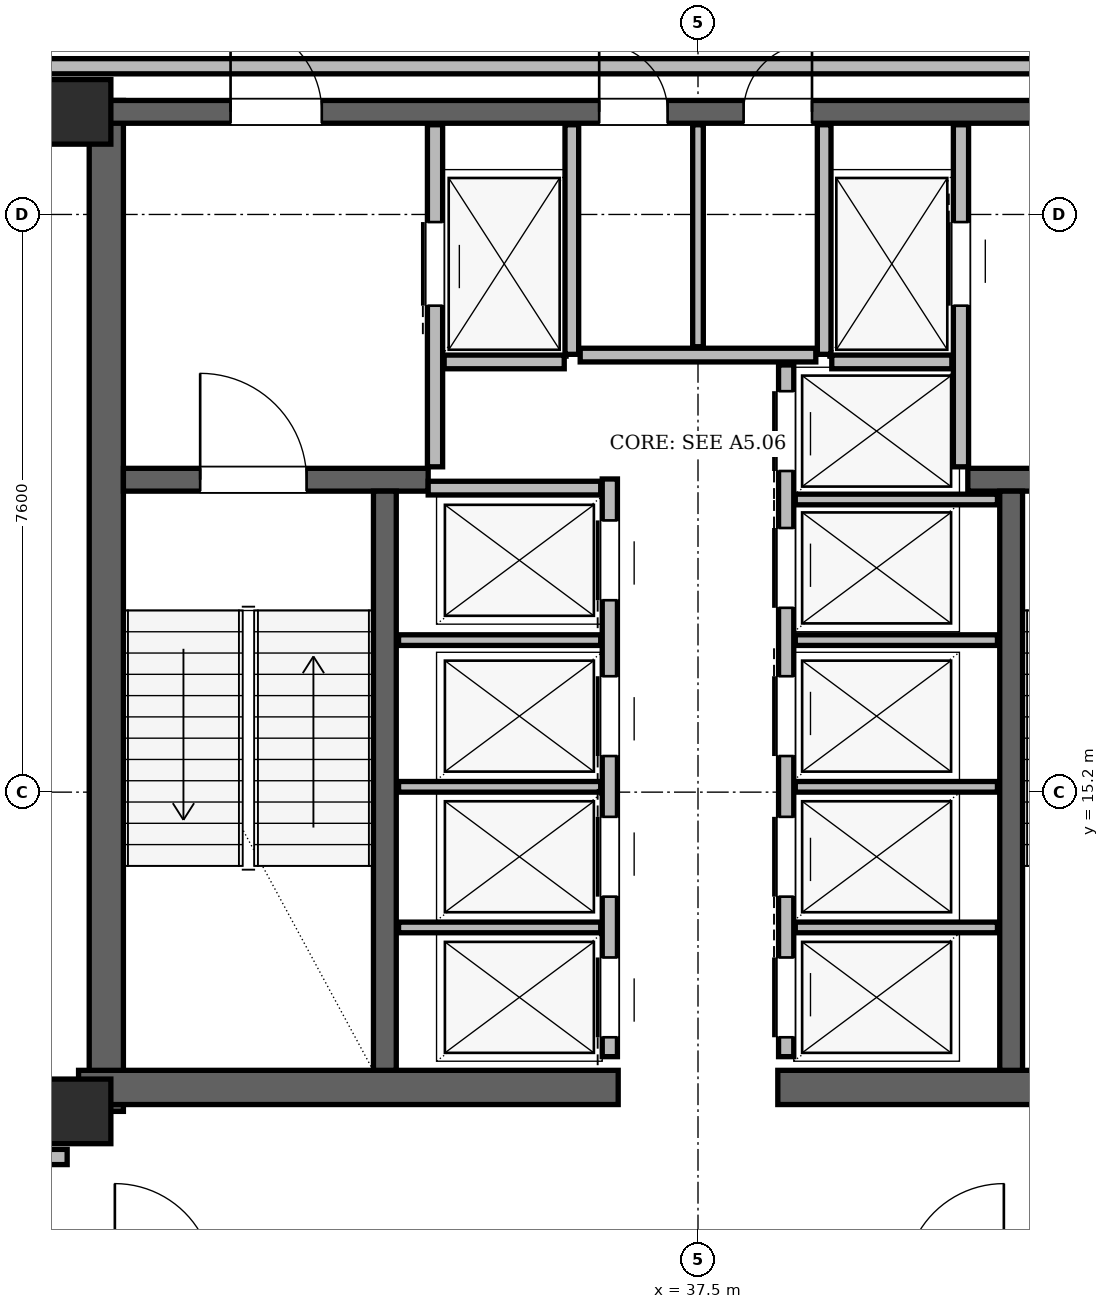
"""IFC4 building model, lengths in metres.
Left out: names, types, materials, properties, quantities, classifications, styles, units other than length and angle.
Written with IfcOpenShell. Run it as: python <this file> out.ifc"""

import sys

from ifc_helpers import new_model, si_unit, direction, frame, frame_2d, origin, origin_2d, place, context, subcontext, project, spatial, rectangle, hollow_rectangle, extrude, element, fill, save


model = new_model("IFC4")
c1 = context("Model", 3, precision=1e-05, world=origin(), true_north=direction((0.0, 1.0)))
c2 = subcontext(c1, "Body", "Model", "MODEL_VIEW")
j1 = project(units=[si_unit("LENGTHUNIT", "METRE"), si_unit("PLANEANGLEUNIT", "RADIAN")], contexts=[c1])
p1 = place(None, origin())
s1 = spatial("IfcSite", under=j1, at=p1, CompositionType="ELEMENT")
p2 = place(p1, origin())
s2 = spatial("IfcBuilding", under=s1, at=p2, CompositionType="ELEMENT")
p3 = place(p2, frame((0.0, 0.0, 107.7)))
s3 = spatial("IfcBuildingStorey", under=s2, at=p3, CompositionType="ELEMENT", Elevation=107.7)
for number, where, z_axis, x_axis in (
    (1, (29.35, 11.0, 0.0), (0.0, 0.0, 1.0), (1.0, 0.0, 0.0)),
    (2, (29.35, 24.15, 0.0), (0.0, 0.0, 1.0), (1.0, 0.0, 0.0)),
):
    element("IfcColumn", number, at=place(p3, frame(where, z_axis=z_axis, x_axis=x_axis)), inside=s3, PredefinedType="COLUMN", context=c2, shape_type="SweptSolid", body=[
        extrude(hollow_rectangle(XDim=0.85, YDim=0.85, WallThickness=0.07, at=origin_2d()), origin(), (0.0, 0.0, 1.0), 4.5),
    ])
p4 = place(p3, frame((29.715, 11.0, 0.0), z_axis=(0.0, 0.0, 1.0), x_axis=(0.0, 1.0, 0.0)))
e3 = element("IfcWall", 3, at=p4, inside=s3, PredefinedType="SHEAR", context=c2, shape_type="SweptSolid", body=[
    extrude(rectangle(XDim=13.3, YDim=0.45, at=frame_2d((6.65, 0.0))), origin(), (0.0, 0.0, 1.0), 4.26),
])
for number, where, z_axis, x_axis in (
    (4, (29.35, 11.315, 0.0), (0.0, 0.0, 1.0), (1.0, 0.0, 0.0)),
    (5, (38.55, 11.315, 0.0), (0.0, 0.0, 1.0), (1.0, 0.0, 0.0)),
):
    element("IfcWall", number, at=place(p3, frame(where, z_axis=z_axis, x_axis=x_axis)), inside=s3, PredefinedType="SHEAR", context=c2, shape_type="SweptSolid", body=[
        extrude(rectangle(XDim=7.1, YDim=0.45, at=frame_2d((3.55, 0.0))), origin(), (0.0, 0.0, 1.0), 4.26),
    ])
p5 = place(p3, frame((29.65, 24.15, 0.0), z_axis=(0.0, 0.0, 1.0), x_axis=(1.0, 0.0, 0.0)))
e6 = element("IfcWall", 6, at=p5, inside=s3, PredefinedType="SHEAR", context=c2, shape_type="SweptSolid", body=[
    extrude(rectangle(XDim=15.7, YDim=0.3, at=frame_2d((7.85, 0.0))), origin(), (0.0, 0.0, 1.0), 4.26),
])
p6 = place(p5, frame((1.7, 0.0, 0.0)))
e7 = element("IfcOpeningElement", 7, at=p6, cuts=e6, PredefinedType="OPENING", context=c2, shape_type="SweptSolid", body=[
    extrude(rectangle(XDim=1.2, YDim=2.2, at=frame_2d((0.6, 1.1))), frame((0.0, 0.15, 0.0), z_axis=(0.0, -1.0, 0.0), x_axis=(1.0, 0.0, 0.0)), (0.0, 0.0, 1.0), 0.3),
])
p7 = place(p5, frame((12.8, 0.0, 0.0)))
e8 = element("IfcOpeningElement", 8, at=p7, cuts=e6, PredefinedType="OPENING", context=c2, shape_type="SweptSolid", body=[
    extrude(rectangle(XDim=1.2, YDim=2.2, at=frame_2d((0.6, 1.1))), frame((0.0, 0.15, 0.0), z_axis=(0.0, -1.0, 0.0), x_axis=(1.0, 0.0, 0.0)), (0.0, 0.0, 1.0), 0.3),
])
p8 = place(p5, frame((6.55, 0.0, 0.0)))
e9 = element("IfcOpeningElement", 9, at=p8, cuts=e6, PredefinedType="OPENING", context=c2, shape_type="SweptSolid", body=[
    extrude(rectangle(XDim=0.9, YDim=2.05, at=frame_2d((0.45, 1.025))), frame((0.0, 0.15, 0.0), z_axis=(0.0, -1.0, 0.0), x_axis=(1.0, 0.0, 0.0)), (0.0, 0.0, 1.0), 0.3),
])
p9 = place(p5, frame((8.45, 0.0, 0.0)))
e10 = element("IfcOpeningElement", 10, at=p9, cuts=e6, PredefinedType="OPENING", context=c2, shape_type="SweptSolid", body=[
    extrude(rectangle(XDim=0.9, YDim=2.05, at=frame_2d((0.45, 1.025))), frame((0.0, 0.15, 0.0), z_axis=(0.0, -1.0, 0.0), x_axis=(1.0, 0.0, 0.0)), (0.0, 0.0, 1.0), 0.3),
])
p10 = place(p3, frame((29.94, 19.31, 0.0), z_axis=(0.0, 0.0, 1.0), x_axis=(1.0, 0.0, 0.0)))
e11 = element("IfcWall", 11, at=p10, inside=s3, PredefinedType="SHEAR", context=c2, shape_type="SweptSolid", body=[
    extrude(rectangle(XDim=4.01, YDim=0.3, at=frame_2d((2.005, 0.0))), origin(), (0.0, 0.0, 1.0), 4.26),
])
p11 = place(p10, frame((1.01, 0.0, 0.0)))
e12 = element("IfcOpeningElement", 12, at=p11, cuts=e11, PredefinedType="OPENING", context=c2, shape_type="SweptSolid", body=[
    extrude(rectangle(XDim=1.4, YDim=2.2, at=frame_2d((0.7, 1.1))), frame((0.0, 0.15, 0.0), z_axis=(0.0, -1.0, 0.0), x_axis=(1.0, 0.0, 0.0)), (0.0, 0.0, 1.0), 0.3),
])
p12 = place(p3, frame((41.05, 19.31, 0.0), z_axis=(0.0, 0.0, 1.0), x_axis=(1.0, 0.0, 0.0)))
e13 = element("IfcWall", 13, at=p12, inside=s3, PredefinedType="SHEAR", context=c2, shape_type="SweptSolid", body=[
    extrude(rectangle(XDim=4.01, YDim=0.3, at=frame_2d((2.005, 0.0))), origin(), (0.0, 0.0, 1.0), 4.26),
])
p13 = place(p12, frame((1.6, 0.0, 0.0)))
e14 = element("IfcOpeningElement", 14, at=p13, cuts=e13, PredefinedType="OPENING", context=c2, shape_type="SweptSolid", body=[
    extrude(rectangle(XDim=1.4, YDim=2.2, at=frame_2d((0.7, 1.1))), frame((0.0, 0.15, 0.0), z_axis=(0.0, -1.0, 0.0), x_axis=(1.0, 0.0, 0.0)), (0.0, 0.0, 1.0), 0.3),
])
for number, where, z_axis, x_axis in (
    (15, (33.38, 11.54, 0.0), (0.0, 0.0, 1.0), (0.0, 1.0, 0.0)),
    (16, (41.62, 11.54, 0.0), (0.0, 0.0, 1.0), (0.0, 1.0, 0.0)),
):
    element("IfcWall", number, at=place(p3, frame(where, z_axis=z_axis, x_axis=x_axis)), inside=s3, PredefinedType="SHEAR", context=c2, shape_type="SweptSolid", body=[
        extrude(rectangle(XDim=7.62, YDim=0.3, at=frame_2d((3.81, 0.0))), origin(), (0.0, 0.0, 1.0), 4.26),
    ])
p14 = place(p3, frame((34.04, 19.48, 0.0), z_axis=(0.0, 0.0, 1.0), x_axis=(0.0, 1.0, 0.0)))
e17 = element("IfcWall", 17, at=p14, inside=s3, PredefinedType="PARTITIONING", context=c2, shape_type="SweptSolid", body=[
    extrude(rectangle(XDim=4.5, YDim=0.2, at=frame_2d((2.25, 0.0))), origin(), (0.0, 0.0, 1.0), 3.3),
])
p15 = place(p14, frame((2.12, 0.0, 0.0)))
e18 = element("IfcOpeningElement", 18, at=p15, cuts=e17, PredefinedType="OPENING", context=c2, shape_type="SweptSolid", body=[
    extrude(rectangle(XDim=1.1, YDim=2.2, at=frame_2d((0.55, 1.1))), frame((0.0, 0.1, 0.0), z_axis=(0.0, -1.0, 0.0), x_axis=(1.0, 0.0, 0.0)), (0.0, 0.0, 1.0), 0.2),
])
p16 = place(p3, frame((35.84, 20.96, 0.0), z_axis=(0.0, 0.0, 1.0), x_axis=(0.0, 1.0, 0.0)))
e19 = element("IfcWall", 19, at=p16, inside=s3, PredefinedType="PARTITIONING", context=c2, shape_type="SweptSolid", body=[
    extrude(rectangle(XDim=3.02, YDim=0.18, at=frame_2d((1.51, 0.0))), origin(), (0.0, 0.0, 1.0), 3.3),
])
p17 = place(p3, frame((34.16, 20.86, 0.0), z_axis=(0.0, 0.0, 1.0), x_axis=(1.0, 0.0, 0.0)))
e20 = element("IfcWall", 20, at=p17, inside=s3, PredefinedType="PARTITIONING", context=c2, shape_type="SweptSolid", body=[
    extrude(rectangle(XDim=1.58, YDim=0.18, at=frame_2d((0.79, 0.0))), origin(), (0.0, 0.0, 1.0), 4.26),
])
p18 = place(p3, frame((40.96, 19.48, 0.0), z_axis=(0.0, 0.0, 1.0), x_axis=(0.0, 1.0, 0.0)))
e21 = element("IfcWall", 21, at=p18, inside=s3, PredefinedType="PARTITIONING", context=c2, shape_type="SweptSolid", body=[
    extrude(rectangle(XDim=4.5, YDim=0.2, at=frame_2d((2.25, 0.0))), origin(), (0.0, 0.0, 1.0), 3.3),
])
p19 = place(p18, frame((2.12, 0.0, 0.0)))
e22 = element("IfcOpeningElement", 22, at=p19, cuts=e21, PredefinedType="OPENING", context=c2, shape_type="SweptSolid", body=[
    extrude(rectangle(XDim=1.1, YDim=2.2, at=frame_2d((0.55, 1.1))), frame((0.0, 0.1, 0.0), z_axis=(0.0, -1.0, 0.0), x_axis=(1.0, 0.0, 0.0)), (0.0, 0.0, 1.0), 0.2),
])
p20 = place(p3, frame((39.16, 20.96, 0.0), z_axis=(0.0, 0.0, 1.0), x_axis=(0.0, 1.0, 0.0)))
e23 = element("IfcWall", 23, at=p20, inside=s3, PredefinedType="PARTITIONING", context=c2, shape_type="SweptSolid", body=[
    extrude(rectangle(XDim=3.02, YDim=0.18, at=frame_2d((1.51, 0.0))), origin(), (0.0, 0.0, 1.0), 3.3),
])
p21 = place(p3, frame((39.26, 20.86, 0.0), z_axis=(0.0, 0.0, 1.0), x_axis=(1.0, 0.0, 0.0)))
e24 = element("IfcWall", 24, at=p21, inside=s3, PredefinedType="PARTITIONING", context=c2, shape_type="SweptSolid", body=[
    extrude(rectangle(XDim=1.58, YDim=0.18, at=frame_2d((0.79, 0.0))), origin(), (0.0, 0.0, 1.0), 4.26),
])
p22 = place(p3, frame((36.34, 11.72, 0.0), z_axis=(0.0, 0.0, 1.0), x_axis=(0.0, 1.0, 0.0)))
e25 = element("IfcWall", 25, at=p22, inside=s3, PredefinedType="PARTITIONING", context=c2, shape_type="SweptSolid", body=[
    extrude(rectangle(XDim=7.6, YDim=0.2, at=frame_2d((3.8, 0.0))), origin(), (0.0, 0.0, 1.0), 4.26),
])
p23 = place(p22, frame((0.255, 0.0, 0.0)))
e26 = element("IfcOpeningElement", 26, at=p23, cuts=e25, PredefinedType="OPENING", context=c2, shape_type="SweptSolid", body=[
    extrude(rectangle(XDim=1.05, YDim=2.15, at=frame_2d((0.525, 1.075))), frame((0.0, 0.1, 0.0), z_axis=(0.0, -1.0, 0.0), x_axis=(1.0, 0.0, 0.0)), (0.0, 0.0, 1.0), 0.2),
])
p24 = place(p22, frame((2.105, 0.0, 0.0)))
e27 = element("IfcOpeningElement", 27, at=p24, cuts=e25, PredefinedType="OPENING", context=c2, shape_type="SweptSolid", body=[
    extrude(rectangle(XDim=1.05, YDim=2.15, at=frame_2d((0.525, 1.075))), frame((0.0, 0.1, 0.0), z_axis=(0.0, -1.0, 0.0), x_axis=(1.0, 0.0, 0.0)), (0.0, 0.0, 1.0), 0.2),
])
p25 = place(p22, frame((3.955, 0.0, 0.0)))
e28 = element("IfcOpeningElement", 28, at=p25, cuts=e25, PredefinedType="OPENING", context=c2, shape_type="SweptSolid", body=[
    extrude(rectangle(XDim=1.05, YDim=2.15, at=frame_2d((0.525, 1.075))), frame((0.0, 0.1, 0.0), z_axis=(0.0, -1.0, 0.0), x_axis=(1.0, 0.0, 0.0)), (0.0, 0.0, 1.0), 0.2),
])
p26 = place(p22, frame((6.005, 0.0, 0.0)))
e29 = element("IfcOpeningElement", 29, at=p26, cuts=e25, PredefinedType="OPENING", context=c2, shape_type="SweptSolid", body=[
    extrude(rectangle(XDim=1.05, YDim=2.15, at=frame_2d((0.525, 1.075))), frame((0.0, 0.1, 0.0), z_axis=(0.0, -1.0, 0.0), x_axis=(1.0, 0.0, 0.0)), (0.0, 0.0, 1.0), 0.2),
])
p27 = place(p3, frame((33.95, 19.2, 0.0), z_axis=(0.0, 0.0, 1.0), x_axis=(1.0, 0.0, 0.0)))
e30 = element("IfcWall", 30, at=p27, inside=s3, PredefinedType="PARTITIONING", context=c2, shape_type="SweptSolid", body=[
    extrude(rectangle(XDim=2.27, YDim=0.18, at=frame_2d((1.135, 0.0))), origin(), (0.0, 0.0, 1.0), 4.26),
])
for number, where, z_axis, x_axis in (
    (31, (33.56, 13.42, 0.0), (0.0, 0.0, 1.0), (1.0, 0.0, 0.0)),
    (32, (33.56, 15.27, 0.0), (0.0, 0.0, 1.0), (1.0, 0.0, 0.0)),
    (33, (33.56, 17.2, 0.0), (0.0, 0.0, 1.0), (1.0, 0.0, 0.0)),
):
    element("IfcWall", number, at=place(p3, frame(where, z_axis=z_axis, x_axis=x_axis)), inside=s3, PredefinedType="PARTITIONING", context=c2, shape_type="SweptSolid", body=[
        extrude(rectangle(XDim=2.66, YDim=0.14, at=frame_2d((1.33, 0.0))), origin(), (0.0, 0.0, 1.0), 4.26),
    ])
p28 = place(p3, frame((38.66, 11.72, 0.0), z_axis=(0.0, 0.0, 1.0), x_axis=(0.0, 1.0, 0.0)))
e34 = element("IfcWall", 34, at=p28, inside=s3, PredefinedType="PARTITIONING", context=c2, shape_type="SweptSolid", body=[
    extrude(rectangle(XDim=9.1, YDim=0.2, at=frame_2d((4.55, 0.0))), origin(), (0.0, 0.0, 1.0), 4.26),
])
p29 = place(p28, frame((0.255, 0.0, 0.0)))
e35 = element("IfcOpeningElement", 35, at=p29, cuts=e34, PredefinedType="OPENING", context=c2, shape_type="SweptSolid", body=[
    extrude(rectangle(XDim=1.05, YDim=2.15, at=frame_2d((0.525, 1.075))), frame((0.0, 0.1, 0.0), z_axis=(0.0, -1.0, 0.0), x_axis=(1.0, 0.0, 0.0)), (0.0, 0.0, 1.0), 0.2),
])
p30 = place(p28, frame((2.105, 0.0, 0.0)))
e36 = element("IfcOpeningElement", 36, at=p30, cuts=e34, PredefinedType="OPENING", context=c2, shape_type="SweptSolid", body=[
    extrude(rectangle(XDim=1.05, YDim=2.15, at=frame_2d((0.525, 1.075))), frame((0.0, 0.1, 0.0), z_axis=(0.0, -1.0, 0.0), x_axis=(1.0, 0.0, 0.0)), (0.0, 0.0, 1.0), 0.2),
])
p31 = place(p28, frame((3.955, 0.0, 0.0)))
e37 = element("IfcOpeningElement", 37, at=p31, cuts=e34, PredefinedType="OPENING", context=c2, shape_type="SweptSolid", body=[
    extrude(rectangle(XDim=1.05, YDim=2.15, at=frame_2d((0.525, 1.075))), frame((0.0, 0.1, 0.0), z_axis=(0.0, -1.0, 0.0), x_axis=(1.0, 0.0, 0.0)), (0.0, 0.0, 1.0), 0.2),
])
p32 = place(p28, frame((5.905, 0.0, 0.0)))
e38 = element("IfcOpeningElement", 38, at=p32, cuts=e34, PredefinedType="OPENING", context=c2, shape_type="SweptSolid", body=[
    extrude(rectangle(XDim=1.05, YDim=2.15, at=frame_2d((0.525, 1.075))), frame((0.0, 0.1, 0.0), z_axis=(0.0, -1.0, 0.0), x_axis=(1.0, 0.0, 0.0)), (0.0, 0.0, 1.0), 0.2),
])
p33 = place(p28, frame((7.705, 0.0, 0.0)))
e39 = element("IfcOpeningElement", 39, at=p33, cuts=e34, PredefinedType="OPENING", context=c2, shape_type="SweptSolid", body=[
    extrude(rectangle(XDim=1.05, YDim=2.15, at=frame_2d((0.525, 1.075))), frame((0.0, 0.1, 0.0), z_axis=(0.0, -1.0, 0.0), x_axis=(1.0, 0.0, 0.0)), (0.0, 0.0, 1.0), 0.2),
])
for number, where, z_axis, x_axis in (
    (40, (38.78, 13.42, 0.0), (0.0, 0.0, 1.0), (1.0, 0.0, 0.0)),
    (41, (38.78, 15.27, 0.0), (0.0, 0.0, 1.0), (1.0, 0.0, 0.0)),
    (42, (38.78, 17.2, 0.0), (0.0, 0.0, 1.0), (1.0, 0.0, 0.0)),
    (43, (38.78, 19.05, 0.0), (0.0, 0.0, 1.0), (1.0, 0.0, 0.0)),
):
    element("IfcWall", number, at=place(p3, frame(where, z_axis=z_axis, x_axis=x_axis)), inside=s3, PredefinedType="PARTITIONING", context=c2, shape_type="SweptSolid", body=[
        extrude(rectangle(XDim=2.66, YDim=0.14, at=frame_2d((1.33, 0.0))), origin(), (0.0, 0.0, 1.0), 4.26),
    ])
p34 = place(p3, frame((35.95, 20.95, 0.0), z_axis=(0.0, 0.0, 1.0), x_axis=(1.0, 0.0, 0.0)))
e44 = element("IfcWall", 44, at=p34, inside=s3, PredefinedType="PARTITIONING", context=c2, shape_type="SweptSolid", body=[
    extrude(rectangle(XDim=3.1, YDim=0.18, at=frame_2d((1.55, 0.0))), origin(), (0.0, 0.0, 1.0), 4.26),
])
p35 = place(p3, frame((37.5, 21.06, 0.0), z_axis=(0.0, 0.0, 1.0), x_axis=(0.0, 1.0, 0.0)))
e45 = element("IfcWall", 45, at=p35, inside=s3, PredefinedType="PARTITIONING", context=c2, shape_type="SweptSolid", body=[
    extrude(rectangle(XDim=2.92, YDim=0.14, at=frame_2d((1.46, 0.0))), origin(), (0.0, 0.0, 1.0), 3.3),
])
p36 = place(p3, frame((28.62, 10.4, 0.0), z_axis=(0.0, 0.0, 1.0), x_axis=(1.0, 0.0, 0.0)))
e46 = element("IfcWall", 46, at=p36, inside=s3, PredefinedType="PARTITIONING", context=c2, shape_type="SweptSolid", body=[
    extrude(rectangle(XDim=0.58, YDim=0.2, at=frame_2d((0.29, 0.0))), origin(), (0.0, 0.0, 1.0), 3.714),
])
p37 = place(p3, frame((28.62, 24.75, 0.0), z_axis=(0.0, 0.0, 1.0), x_axis=(1.0, 0.0, 0.0)))
e47 = element("IfcWall", 47, at=p37, inside=s3, PredefinedType="PARTITIONING", context=c2, shape_type="SweptSolid", body=[
    extrude(rectangle(XDim=17.76, YDim=0.2, at=frame_2d((8.88, 0.0))), origin(), (0.0, 0.0, 1.0), 3.714),
])
p38 = place(p15, origin())
e48 = element("IfcDoor", 48, at=p38, inside=s3, OperationType="SLIDING_TO_LEFT", PredefinedType="DOOR", context=c2, shape_type="SweptSolid", body=[
    extrude(rectangle(XDim=1.1, YDim=2.2, at=frame_2d((0.55, 1.1))), frame((0.0, 0.025, 0.0), z_axis=(0.0, -1.0, 0.0), x_axis=(1.0, 0.0, 0.0)), (0.0, 0.0, 1.0), 0.05),
])
fill(e18, e48)
p39 = place(p19, origin())
e49 = element("IfcDoor", 49, at=p39, inside=s3, OperationType="SLIDING_TO_RIGHT", PredefinedType="DOOR", context=c2, shape_type="SweptSolid", body=[
    extrude(rectangle(XDim=1.1, YDim=2.2, at=frame_2d((0.55, 1.1))), frame((0.0, 0.025, 0.0), z_axis=(0.0, -1.0, 0.0), x_axis=(1.0, 0.0, 0.0)), (0.0, 0.0, 1.0), 0.05),
])
fill(e22, e49)
p40 = place(p23, origin())
e50 = element("IfcDoor", 50, at=p40, inside=s3, OperationType="SLIDING_TO_LEFT", PredefinedType="DOOR", context=c2, shape_type="SweptSolid", body=[
    extrude(rectangle(XDim=1.05, YDim=2.15, at=frame_2d((0.525, 1.075))), frame((0.0, 0.025, 0.0), z_axis=(0.0, -1.0, 0.0), x_axis=(1.0, 0.0, 0.0)), (0.0, 0.0, 1.0), 0.05),
])
fill(e26, e50)
p41 = place(p24, origin())
e51 = element("IfcDoor", 51, at=p41, inside=s3, OperationType="SLIDING_TO_RIGHT", PredefinedType="DOOR", context=c2, shape_type="SweptSolid", body=[
    extrude(rectangle(XDim=1.05, YDim=2.15, at=frame_2d((0.525, 1.075))), frame((0.0, 0.025, 0.0), z_axis=(0.0, -1.0, 0.0), x_axis=(1.0, 0.0, 0.0)), (0.0, 0.0, 1.0), 0.05),
])
fill(e27, e51)
p42 = place(p25, origin())
e52 = element("IfcDoor", 52, at=p42, inside=s3, OperationType="SLIDING_TO_LEFT", PredefinedType="DOOR", context=c2, shape_type="SweptSolid", body=[
    extrude(rectangle(XDim=1.05, YDim=2.15, at=frame_2d((0.525, 1.075))), frame((0.0, 0.025, 0.0), z_axis=(0.0, -1.0, 0.0), x_axis=(1.0, 0.0, 0.0)), (0.0, 0.0, 1.0), 0.05),
])
fill(e28, e52)
p43 = place(p29, origin())
e53 = element("IfcDoor", 53, at=p43, inside=s3, OperationType="SLIDING_TO_RIGHT", PredefinedType="DOOR", context=c2, shape_type="SweptSolid", body=[
    extrude(rectangle(XDim=1.05, YDim=2.15, at=frame_2d((0.525, 1.075))), frame((0.0, 0.025, 0.0), z_axis=(0.0, -1.0, 0.0), x_axis=(1.0, 0.0, 0.0)), (0.0, 0.0, 1.0), 0.05),
])
fill(e35, e53)
p44 = place(p30, origin())
e54 = element("IfcDoor", 54, at=p44, inside=s3, OperationType="SLIDING_TO_LEFT", PredefinedType="DOOR", context=c2, shape_type="SweptSolid", body=[
    extrude(rectangle(XDim=1.05, YDim=2.15, at=frame_2d((0.525, 1.075))), frame((0.0, 0.025, 0.0), z_axis=(0.0, -1.0, 0.0), x_axis=(1.0, 0.0, 0.0)), (0.0, 0.0, 1.0), 0.05),
])
fill(e36, e54)
p45 = place(p31, origin())
e55 = element("IfcDoor", 55, at=p45, inside=s3, OperationType="SLIDING_TO_RIGHT", PredefinedType="DOOR", context=c2, shape_type="SweptSolid", body=[
    extrude(rectangle(XDim=1.05, YDim=2.15, at=frame_2d((0.525, 1.075))), frame((0.0, 0.025, 0.0), z_axis=(0.0, -1.0, 0.0), x_axis=(1.0, 0.0, 0.0)), (0.0, 0.0, 1.0), 0.05),
])
fill(e37, e55)
p46 = place(p26, origin())
e56 = element("IfcDoor", 56, at=p46, inside=s3, OperationType="SLIDING_TO_LEFT", PredefinedType="DOOR", context=c2, shape_type="SweptSolid", body=[
    extrude(rectangle(XDim=1.05, YDim=2.15, at=frame_2d((0.525, 1.075))), frame((0.0, 0.025, 0.0), z_axis=(0.0, -1.0, 0.0), x_axis=(1.0, 0.0, 0.0)), (0.0, 0.0, 1.0), 0.05),
])
fill(e29, e56)
p47 = place(p32, origin())
e57 = element("IfcDoor", 57, at=p47, inside=s3, OperationType="SLIDING_TO_RIGHT", PredefinedType="DOOR", context=c2, shape_type="SweptSolid", body=[
    extrude(rectangle(XDim=1.05, YDim=2.15, at=frame_2d((0.525, 1.075))), frame((0.0, 0.025, 0.0), z_axis=(0.0, -1.0, 0.0), x_axis=(1.0, 0.0, 0.0)), (0.0, 0.0, 1.0), 0.05),
])
fill(e38, e57)
p48 = place(p33, origin())
e58 = element("IfcDoor", 58, at=p48, inside=s3, OperationType="SLIDING_TO_LEFT", PredefinedType="DOOR", context=c2, shape_type="SweptSolid", body=[
    extrude(rectangle(XDim=1.05, YDim=2.15, at=frame_2d((0.525, 1.075))), frame((0.0, 0.025, 0.0), z_axis=(0.0, -1.0, 0.0), x_axis=(1.0, 0.0, 0.0)), (0.0, 0.0, 1.0), 0.05),
])
fill(e39, e58)
p49 = place(p11, origin())
e59 = element("IfcDoor", 59, at=p49, inside=s3, OperationType="SINGLE_SWING_LEFT", PredefinedType="DOOR", context=c2, shape_type="SweptSolid", body=[
    extrude(rectangle(XDim=1.4, YDim=2.2, at=frame_2d((0.7, 1.1))), frame((0.0, 0.025, 0.0), z_axis=(0.0, -1.0, 0.0), x_axis=(1.0, 0.0, 0.0)), (0.0, 0.0, 1.0), 0.05),
])
fill(e12, e59)
p50 = place(p6, origin())
e60 = element("IfcDoor", 60, at=p50, inside=s3, OperationType="SINGLE_SWING_LEFT", PredefinedType="DOOR", context=c2, shape_type="SweptSolid", body=[
    extrude(rectangle(XDim=1.2, YDim=2.2, at=frame_2d((0.6, 1.1))), frame((0.0, 0.025, 0.0), z_axis=(0.0, -1.0, 0.0), x_axis=(1.0, 0.0, 0.0)), (0.0, 0.0, 1.0), 0.05),
])
fill(e7, e60)
p51 = place(p8, origin())
e61 = element("IfcDoor", 61, at=p51, inside=s3, OperationType="SINGLE_SWING_LEFT", PredefinedType="DOOR", context=c2, shape_type="SweptSolid", body=[
    extrude(rectangle(XDim=0.9, YDim=2.05, at=frame_2d((0.45, 1.025))), frame((0.0, 0.025, 0.0), z_axis=(0.0, -1.0, 0.0), x_axis=(1.0, 0.0, 0.0)), (0.0, 0.0, 1.0), 0.05),
])
fill(e9, e61)
p52 = place(p9, origin())
e62 = element("IfcDoor", 62, at=p52, inside=s3, OperationType="SINGLE_SWING_RIGHT", PredefinedType="DOOR", context=c2, shape_type="SweptSolid", body=[
    extrude(rectangle(XDim=0.9, YDim=2.05, at=frame_2d((0.45, 1.025))), frame((0.0, 0.025, 0.0), z_axis=(0.0, -1.0, 0.0), x_axis=(1.0, 0.0, 0.0)), (0.0, 0.0, 1.0), 0.05),
])
fill(e10, e62)
save(model, sys.argv[1])
